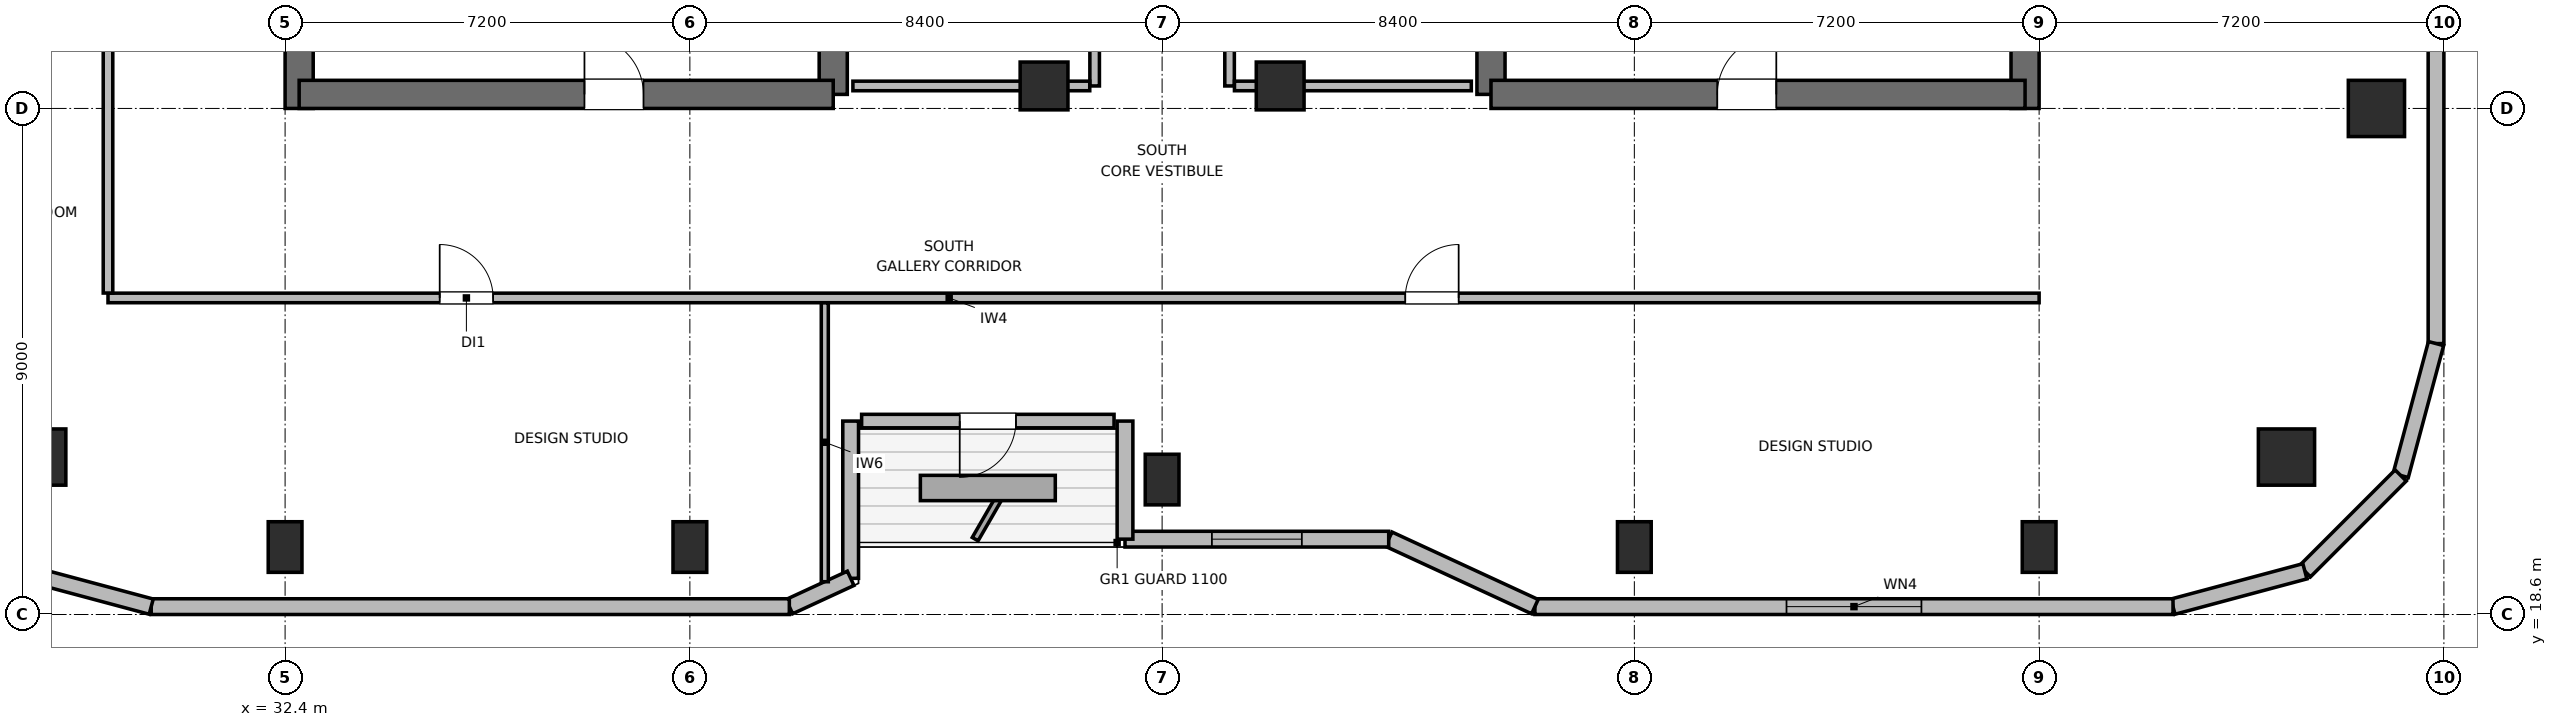
"""IFC4 building model, lengths in metres.
Left out: names, types, materials, properties, quantities, classifications, styles, units other than length and angle.
Written with IfcOpenShell. Run it as: python <this file> out.ifc"""

import sys

from ifc_helpers import new_model, si_unit, direction, frame, frame_2d, origin, origin_2d, place, context, subcontext, project, spatial, rectangle, circle, extrude, element, fill, save


model = new_model("IFC4")
c1 = context("Model", 3, precision=1e-05, world=origin(), true_north=direction((0.0, 1.0)))
c2 = subcontext(c1, "Body", "Model", "MODEL_VIEW")
j1 = project(units=[si_unit("LENGTHUNIT", "METRE"), si_unit("PLANEANGLEUNIT", "RADIAN")], contexts=[c1])
p1 = place(None, origin())
s1 = spatial("IfcSite", under=j1, at=p1, CompositionType="ELEMENT")
p2 = place(p1, origin())
s2 = spatial("IfcBuilding", under=s1, at=p2, CompositionType="ELEMENT")
p3 = place(p2, frame((0.0, 0.0, 290.1)))
s3 = spatial("IfcBuildingStorey", under=s2, at=p3, CompositionType="ELEMENT", Elevation=290.1)
p4 = place(p3, frame((32.65, 27.6, 0.0), z_axis=(0.0, 0.0, 1.0), x_axis=(0.0, 1.0, 0.0)))
e1 = element("IfcWall", 1, at=p4, inside=s3, PredefinedType="SHEAR", context=c2, shape_type="SweptSolid", body=[
    extrude(rectangle(XDim=16.8, YDim=0.5, at=frame_2d((8.4, 0.0))), origin(), (0.0, 0.0, 1.0), 3.9),
])
p5 = place(p3, frame((42.15, 27.85, 0.0), z_axis=(0.0, 0.0, 1.0), x_axis=(0.0, 1.0, 0.0)))
e2 = element("IfcWall", 2, at=p5, inside=s3, PredefinedType="SHEAR", context=c2, shape_type="SweptSolid", body=[
    extrude(rectangle(XDim=6.55, YDim=0.5, at=frame_2d((3.275, 0.0))), origin(), (0.0, 0.0, 1.0), 3.9),
])
p6 = place(p3, frame((32.65, 27.85, 0.0), z_axis=(0.0, 0.0, 1.0), x_axis=(1.0, 0.0, 0.0)))
e3 = element("IfcWall", 3, at=p6, inside=s3, PredefinedType="SHEAR", context=c2, shape_type="SweptSolid", body=[
    extrude(rectangle(XDim=9.5, YDim=0.5, at=frame_2d((4.75, 0.0))), origin(), (0.0, 0.0, 1.0), 3.9),
])
p7 = place(p6, frame((5.075, 0.0, 0.0)))
e4 = element("IfcOpeningElement", 4, at=p7, cuts=e3, PredefinedType="OPENING", context=c2, shape_type="SweptSolid", body=[
    extrude(rectangle(XDim=1.05, YDim=2.04, at=frame_2d((0.525, 1.02))), frame((0.0, 0.26, 0.0), z_axis=(0.0, -1.0, 0.0), x_axis=(1.0, 0.0, 0.0)), (0.0, 0.0, 1.0), 0.52),
])
p8 = place(p3, frame((53.85, 27.85, 0.0), z_axis=(0.0, 0.0, 1.0), x_axis=(0.0, 1.0, 0.0)))
e5 = element("IfcWall", 5, at=p8, inside=s3, PredefinedType="SHEAR", context=c2, shape_type="SweptSolid", body=[
    extrude(rectangle(XDim=7.95, YDim=0.5, at=frame_2d((3.975, 0.0))), origin(), (0.0, 0.0, 1.0), 3.9),
])
p9 = place(p3, frame((63.35, 27.6, 0.0), z_axis=(0.0, 0.0, 1.0), x_axis=(0.0, 1.0, 0.0)))
e6 = element("IfcWall", 6, at=p9, inside=s3, PredefinedType="SHEAR", context=c2, shape_type="SweptSolid", body=[
    extrude(rectangle(XDim=16.8, YDim=0.5, at=frame_2d((8.4, 0.0))), origin(), (0.0, 0.0, 1.0), 3.9),
])
p10 = place(p3, frame((53.85, 27.85, 0.0), z_axis=(0.0, 0.0, 1.0), x_axis=(1.0, 0.0, 0.0)))
e7 = element("IfcWall", 7, at=p10, inside=s3, PredefinedType="SHEAR", context=c2, shape_type="SweptSolid", body=[
    extrude(rectangle(XDim=9.5, YDim=0.5, at=frame_2d((4.75, 0.0))), origin(), (0.0, 0.0, 1.0), 3.9),
])
p11 = place(p10, frame((4.025, 0.0, 0.0)))
e8 = element("IfcOpeningElement", 8, at=p11, cuts=e7, PredefinedType="OPENING", context=c2, shape_type="SweptSolid", body=[
    extrude(rectangle(XDim=1.05, YDim=2.04, at=frame_2d((0.525, 1.02))), frame((0.0, 0.26, 0.0), z_axis=(0.0, -1.0, 0.0), x_axis=(1.0, 0.0, 0.0)), (0.0, 0.0, 1.0), 0.52),
])
for number, where, z_axis, x_axis in (
    (9, (28.0, 21.4, 0.0), (0.0, 0.0, 1.0), (1.0, 0.0, 0.0)),
    (10, (68.0, 21.4, 0.0), (0.0, 0.0, 1.0), (1.0, 0.0, 0.0)),
):
    element("IfcColumn", number, at=place(p3, frame(where, z_axis=z_axis, x_axis=x_axis)), inside=s3, PredefinedType="COLUMN", context=c2, shape_type="SweptSolid", body=[
        extrude(circle(Radius=0.5, at=origin_2d()), origin(), (0.0, 0.0, 1.0), 3.9),
    ])
for number, where, z_axis, x_axis in (
    (11, (32.4, 19.8, 0.0), (0.0, 0.0, 1.0), (1.0, 0.0, 0.0)),
    (12, (39.6, 19.8, 0.0), (0.0, 0.0, 1.0), (1.0, 0.0, 0.0)),
    (13, (48.0, 21.0, 0.0), (0.0, 0.0, 1.0), (1.0, 0.0, 0.0)),
    (14, (56.4, 19.8, 0.0), (0.0, 0.0, 1.0), (1.0, 0.0, 0.0)),
    (15, (63.6, 19.8, 0.0), (0.0, 0.0, 1.0), (1.0, 0.0, 0.0)),
):
    element("IfcColumn", number, at=place(p3, frame(where, z_axis=z_axis, x_axis=x_axis)), inside=s3, PredefinedType="COLUMN", context=c2, shape_type="SweptSolid", body=[
        extrude(rectangle(XDim=0.6, YDim=0.9, at=origin_2d()), origin(), (0.0, 0.0, 1.0), 3.9),
    ])
p12 = place(p3, frame((69.6, 27.6, 0.0), z_axis=(0.0, 0.0, 1.0), x_axis=(1.0, 0.0, 0.0)))
e16 = element("IfcColumn", 16, at=p12, inside=s3, PredefinedType="COLUMN", context=c2, shape_type="SweptSolid", body=[
    extrude(rectangle(XDim=1.0, YDim=1.0, at=origin_2d()), origin(), (0.0, 0.0, 1.0), 3.9),
])
for number, where, z_axis, x_axis in (
    (17, (45.9, 28.0, 0.0), (0.0, 0.0, 1.0), (1.0, 0.0, 0.0)),
    (18, (50.1, 28.0, 0.0), (0.0, 0.0, 1.0), (1.0, 0.0, 0.0)),
):
    element("IfcColumn", number, at=place(p3, frame(where, z_axis=z_axis, x_axis=x_axis)), inside=s3, PredefinedType="COLUMN", context=c2, shape_type="SweptSolid", body=[
        extrude(rectangle(XDim=0.85, YDim=0.85, at=origin_2d()), origin(), (0.0, 0.0, 1.0), 3.9),
    ])
p13 = place(p3, frame((70.66, 37.66, 0.0), z_axis=(0.0, 0.0, 1.0), x_axis=(0.0, -1.0, 0.0)))
e19 = element("IfcWall", 19, at=p13, inside=s3, PredefinedType="SOLIDWALL", context=c2, shape_type="SweptSolid", body=[
    extrude(rectangle(XDim=14.241, YDim=0.28, at=frame_2d((7.121, 0.0))), origin(), (0.0, 0.0, 1.0), 3.68),
])
p14 = place(p13, frame((6.321, 0.0, 0.85)))
e20 = element("IfcOpeningElement", 20, at=p14, cuts=e19, PredefinedType="OPENING", context=c2, shape_type="SweptSolid", body=[
    extrude(rectangle(XDim=1.6, YDim=1.0, at=frame_2d((0.8, 0.5))), frame((0.0, 0.15, 0.0), z_axis=(0.0, -1.0, 0.0), x_axis=(1.0, 0.0, 0.0)), (0.0, 0.0, 1.0), 0.3),
])
p15 = place(p3, frame((70.66, 23.418, 0.0), z_axis=(0.0, 0.0, 1.0), x_axis=(-0.258751159445, -0.965944013639, 0.0)))
e21 = element("IfcWall", 21, at=p15, inside=s3, PredefinedType="SOLIDWALL", context=c2, shape_type="SweptSolid", body=[
    extrude(rectangle(XDim=2.429, YDim=0.28, at=frame_2d((1.214, 0.0))), origin(), (0.0, 0.0, 1.0), 3.68),
])
p16 = place(p3, frame((70.031, 21.073, 0.0), z_axis=(0.0, 0.0, 1.0), x_axis=(-0.707106781187, -0.707106781187, 0.0)))
e22 = element("IfcWall", 22, at=p16, inside=s3, PredefinedType="SOLIDWALL", context=c2, shape_type="SweptSolid", body=[
    extrude(rectangle(XDim=2.41, YDim=0.28, at=frame_2d((1.205, 0.0))), origin(), (0.0, 0.0, 1.0), 3.68),
])
p17 = place(p3, frame((68.327, 19.368, 0.0), z_axis=(0.0, 0.0, 1.0), x_axis=(-0.965937282298, -0.25877628691, 0.0)))
e23 = element("IfcWall", 23, at=p17, inside=s3, PredefinedType="SOLIDWALL", context=c2, shape_type="SweptSolid", body=[
    extrude(rectangle(XDim=2.428, YDim=0.28, at=frame_2d((1.214, 0.0))), origin(), (0.0, 0.0, 1.0), 3.68),
])
p18 = place(p3, frame((65.982, 18.74, 0.0), z_axis=(0.0, 0.0, 1.0), x_axis=(-1.0, 0.0, 0.0)))
e24 = element("IfcWall", 24, at=p18, inside=s3, PredefinedType="SOLIDWALL", context=c2, shape_type="SweptSolid", body=[
    extrude(rectangle(XDim=11.351, YDim=0.28, at=frame_2d((5.676, 0.0))), origin(), (0.0, 0.0, 1.0), 3.68),
])
p19 = place(p18, frame((4.475, 0.0, 0.85)))
e25 = element("IfcOpeningElement", 25, at=p19, cuts=e24, PredefinedType="OPENING", context=c2, shape_type="SweptSolid", body=[
    extrude(rectangle(XDim=2.4, YDim=1.15, at=frame_2d((1.2, 0.575))), frame((0.0, 0.15, 0.0), z_axis=(0.0, -1.0, 0.0), x_axis=(1.0, 0.0, 0.0)), (0.0, 0.0, 1.0), 0.3),
])
p20 = place(p3, frame((54.631, 18.74, 0.0), z_axis=(0.0, 0.0, 1.0), x_axis=(-0.907956889006, 0.419063584324, 0.0)))
e26 = element("IfcWall", 26, at=p20, inside=s3, PredefinedType="SOLIDWALL", context=c2, shape_type="SweptSolid", body=[
    extrude(rectangle(XDim=2.864, YDim=0.28, at=frame_2d((1.432, 0.0))), origin(), (0.0, 0.0, 1.0), 2.265),
])
p21 = place(p3, frame((52.031, 19.94, 0.0), z_axis=(0.0, 0.0, 1.0), x_axis=(-1.0, 0.0, 0.0)))
e27 = element("IfcWall", 27, at=p21, inside=s3, PredefinedType="SOLIDWALL", context=c2, shape_type="SweptSolid", body=[
    extrude(rectangle(XDim=4.691, YDim=0.28, at=frame_2d((2.345, 0.0))), origin(), (0.0, 0.0, 1.0), 2.265),
])
p22 = place(p21, frame((1.545, 0.0, 0.85)))
e28 = element("IfcOpeningElement", 28, at=p22, cuts=e27, PredefinedType="OPENING", context=c2, shape_type="SweptSolid", body=[
    extrude(rectangle(XDim=1.6, YDim=1.0, at=frame_2d((0.8, 0.5))), frame((0.0, 0.15, 0.0), z_axis=(0.0, -1.0, 0.0), x_axis=(1.0, 0.0, 0.0)), (0.0, 0.0, 1.0), 0.3),
])
p23 = place(p3, frame((47.34, 19.94, 0.0), z_axis=(0.0, 0.0, 1.0), x_axis=(0.0, 1.0, 0.0)))
e29 = element("IfcWall", 29, at=p23, inside=s3, PredefinedType="SOLIDWALL", context=c2, shape_type="SweptSolid", body=[
    extrude(rectangle(XDim=2.1, YDim=0.28, at=frame_2d((1.05, 0.0))), origin(), (0.0, 0.0, 1.0), 2.265),
])
p24 = place(p3, frame((47.145, 22.04, 0.0), z_axis=(0.0, 0.0, 1.0), x_axis=(-1.0, 0.0, 0.0)))
e30 = element("IfcWall", 30, at=p24, inside=s3, PredefinedType="SOLIDWALL", context=c2, shape_type="SweptSolid", body=[
    extrude(rectangle(XDim=4.49, YDim=0.24, at=frame_2d((2.245, 0.0))), origin(), (0.0, 0.0, 1.0), 3.68),
])
p25 = place(p24, frame((1.745, 0.0, 0.0)))
e31 = element("IfcOpeningElement", 31, at=p25, cuts=e30, PredefinedType="OPENING", context=c2, shape_type="SweptSolid", body=[
    extrude(rectangle(XDim=1.0, YDim=2.02, at=frame_2d((0.5, 1.01))), frame((0.0, 0.13, 0.0), z_axis=(0.0, -1.0, 0.0), x_axis=(1.0, 0.0, 0.0)), (0.0, 0.0, 1.0), 0.26),
])
p26 = place(p3, frame((42.46, 22.04, 0.0), z_axis=(0.0, 0.0, 1.0), x_axis=(0.0, -1.0, 0.0)))
e32 = element("IfcWall", 32, at=p26, inside=s3, PredefinedType="SOLIDWALL", context=c2, shape_type="SweptSolid", body=[
    extrude(rectangle(XDim=2.796, YDim=0.28, at=frame_2d((1.398, 0.0))), origin(), (0.0, 0.0, 1.0), 2.265),
])
p27 = place(p3, frame((42.46, 19.244, 0.0), z_axis=(0.0, 0.0, 1.0), x_axis=(-0.907893953211, -0.419199916176, 0.0)))
e33 = element("IfcWall", 33, at=p27, inside=s3, PredefinedType="SOLIDWALL", context=c2, shape_type="SweptSolid", body=[
    extrude(rectangle(XDim=1.201, YDim=0.28, at=frame_2d((0.601, 0.0))), origin(), (0.0, 0.0, 1.0), 3.68),
])
p28 = place(p3, frame((41.369, 18.74, 0.0), z_axis=(0.0, 0.0, 1.0), x_axis=(-1.0, 0.0, 0.0)))
e34 = element("IfcWall", 34, at=p28, inside=s3, PredefinedType="SOLIDWALL", context=c2, shape_type="SweptSolid", body=[
    extrude(rectangle(XDim=11.351, YDim=0.28, at=frame_2d((5.675, 0.0))), origin(), (0.0, 0.0, 1.0), 3.68),
])
p29 = place(p3, frame((30.018, 18.74, 0.0), z_axis=(0.0, 0.0, 1.0), x_axis=(-0.965937282298, 0.25877628691, 0.0)))
e35 = element("IfcWall", 35, at=p29, inside=s3, PredefinedType="SOLIDWALL", context=c2, shape_type="SweptSolid", body=[
    extrude(rectangle(XDim=2.428, YDim=0.28, at=frame_2d((1.214, 0.0))), origin(), (0.0, 0.0, 1.0), 3.68),
])
p30 = place(p3, frame((46.8, 28.0, 0.0), z_axis=(0.0, 0.0, 1.0), x_axis=(0.0, 1.0, 0.0)))
e36 = element("IfcWall", 36, at=p30, inside=s3, PredefinedType="PARTITIONING", context=c2, shape_type="SweptSolid", body=[
    extrude(rectangle(XDim=4.5, YDim=0.17, at=frame_2d((2.25, 0.0))), origin(), (0.0, 0.0, 1.0), 3.68),
])
p31 = place(p30, frame((0.99, 0.0, 0.0)))
e37 = element("IfcOpeningElement", 37, at=p31, cuts=e36, PredefinedType="OPENING", context=c2, shape_type="SweptSolid", body=[
    extrude(rectangle(XDim=0.9, YDim=2.02, at=frame_2d((0.45, 1.01))), frame((0.0, 0.095, 0.0), z_axis=(0.0, -1.0, 0.0), x_axis=(1.0, 0.0, 0.0)), (0.0, 0.0, 1.0), 0.19),
])
p32 = place(p30, frame((3.24, 0.0, 0.0)))
e38 = element("IfcOpeningElement", 38, at=p32, cuts=e36, PredefinedType="OPENING", context=c2, shape_type="SweptSolid", body=[
    extrude(rectangle(XDim=0.9, YDim=2.02, at=frame_2d((0.45, 1.01))), frame((0.0, 0.095, 0.0), z_axis=(0.0, -1.0, 0.0), x_axis=(1.0, 0.0, 0.0)), (0.0, 0.0, 1.0), 0.19),
])
p33 = place(p3, frame((42.5, 28.0, 0.0), z_axis=(0.0, 0.0, 1.0), x_axis=(1.0, 0.0, 0.0)))
e39 = element("IfcWall", 39, at=p33, inside=s3, PredefinedType="PARTITIONING", context=c2, shape_type="SweptSolid", body=[
    extrude(rectangle(XDim=4.213, YDim=0.17, at=frame_2d((2.106, 0.0))), origin(), (0.0, 0.0, 1.0), 2.765),
])
p34 = place(p3, frame((49.2, 28.0, 0.0), z_axis=(0.0, 0.0, 1.0), x_axis=(0.0, 1.0, 0.0)))
e40 = element("IfcWall", 40, at=p34, inside=s3, PredefinedType="PARTITIONING", context=c2, shape_type="SweptSolid", body=[
    extrude(rectangle(XDim=4.5, YDim=0.17, at=frame_2d((2.25, 0.0))), origin(), (0.0, 0.0, 1.0), 3.68),
])
p35 = place(p34, frame((0.675, 0.0, 0.0)))
e41 = element("IfcOpeningElement", 41, at=p35, cuts=e40, PredefinedType="OPENING", context=c2, shape_type="SweptSolid", body=[
    extrude(rectangle(XDim=0.9, YDim=2.02, at=frame_2d((0.45, 1.01))), frame((0.0, 0.095, 0.0), z_axis=(0.0, -1.0, 0.0), x_axis=(1.0, 0.0, 0.0)), (0.0, 0.0, 1.0), 0.19),
])
p36 = place(p34, frame((2.925, 0.0, 0.0)))
e42 = element("IfcOpeningElement", 42, at=p36, cuts=e40, PredefinedType="OPENING", context=c2, shape_type="SweptSolid", body=[
    extrude(rectangle(XDim=0.9, YDim=2.02, at=frame_2d((0.45, 1.01))), frame((0.0, 0.095, 0.0), z_axis=(0.0, -1.0, 0.0), x_axis=(1.0, 0.0, 0.0)), (0.0, 0.0, 1.0), 0.19),
])
p37 = place(p3, frame((49.287, 28.0, 0.0), z_axis=(0.0, 0.0, 1.0), x_axis=(1.0, 0.0, 0.0)))
e43 = element("IfcWall", 43, at=p37, inside=s3, PredefinedType="PARTITIONING", context=c2, shape_type="SweptSolid", body=[
    extrude(rectangle(XDim=4.213, YDim=0.17, at=frame_2d((2.106, 0.0))), origin(), (0.0, 0.0, 1.0), 2.765),
])
p38 = place(p3, frame((29.25, 24.23, 0.0), z_axis=(0.0, 0.0, 1.0), x_axis=(1.0, 0.0, 0.0)))
e44 = element("IfcWall", 44, at=p38, inside=s3, PredefinedType="PARTITIONING", context=c2, shape_type="SweptSolid", body=[
    extrude(rectangle(XDim=34.35, YDim=0.17, at=frame_2d((17.175, 0.0))), origin(), (0.0, 0.0, 1.0), 3.68),
])
p39 = place(p38, frame((5.9, 0.0, 0.0)))
e45 = element("IfcOpeningElement", 45, at=p39, cuts=e44, PredefinedType="OPENING", context=c2, shape_type="SweptSolid", body=[
    extrude(rectangle(XDim=0.95, YDim=2.04, at=frame_2d((0.475, 1.02))), frame((0.0, 0.095, 0.0), z_axis=(0.0, -1.0, 0.0), x_axis=(1.0, 0.0, 0.0)), (0.0, 0.0, 1.0), 0.19),
])
p40 = place(p38, frame((23.075, 0.0, 0.0)))
e46 = element("IfcOpeningElement", 46, at=p40, cuts=e44, PredefinedType="OPENING", context=c2, shape_type="SweptSolid", body=[
    extrude(rectangle(XDim=0.95, YDim=2.04, at=frame_2d((0.475, 1.02))), frame((0.0, 0.095, 0.0), z_axis=(0.0, -1.0, 0.0), x_axis=(1.0, 0.0, 0.0)), (0.0, 0.0, 1.0), 0.19),
])
p41 = place(p3, frame((29.25, 24.317, 0.0), z_axis=(0.0, 0.0, 1.0), x_axis=(0.0, 1.0, 0.0)))
e47 = element("IfcWall", 47, at=p41, inside=s3, PredefinedType="PARTITIONING", context=c2, shape_type="SweptSolid", body=[
    extrude(rectangle(XDim=23.366, YDim=0.17, at=frame_2d((11.683, 0.0))), origin(), (0.0, 0.0, 1.0), 3.68),
])
p42 = place(p41, frame((4.923, 0.0, 0.0)))
e48 = element("IfcOpeningElement", 48, at=p42, cuts=e47, PredefinedType="OPENING", context=c2, shape_type="SweptSolid", body=[
    extrude(rectangle(XDim=0.95, YDim=2.04, at=frame_2d((0.475, 1.02))), frame((0.0, 0.095, 0.0), z_axis=(0.0, -1.0, 0.0), x_axis=(1.0, 0.0, 0.0)), (0.0, 0.0, 1.0), 0.19),
])
p43 = place(p41, frame((16.693, 0.0, 0.0)))
e49 = element("IfcOpeningElement", 49, at=p43, cuts=e47, PredefinedType="OPENING", context=c2, shape_type="SweptSolid", body=[
    extrude(rectangle(XDim=0.95, YDim=2.04, at=frame_2d((0.475, 1.02))), frame((0.0, 0.095, 0.0), z_axis=(0.0, -1.0, 0.0), x_axis=(1.0, 0.0, 0.0)), (0.0, 0.0, 1.0), 0.19),
])
p44 = place(p3, frame((42.0, 19.183, 0.0), z_axis=(0.0, 0.0, 1.0), x_axis=(0.0, 1.0, 0.0)))
e50 = element("IfcWall", 50, at=p44, inside=s3, PredefinedType="PARTITIONING", context=c2, shape_type="SweptSolid", body=[
    extrude(rectangle(XDim=4.96, YDim=0.125, at=frame_2d((2.48, 0.0))), origin(), (0.0, 0.0, 1.0), 3.043),
])
p45 = place(p19, origin())
e51 = element("IfcWindow", 51, at=p45, inside=s3, PartitioningType="SINGLE_PANEL", PredefinedType="WINDOW", context=c2, shape_type="SweptSolid", body=[
    extrude(rectangle(XDim=2.4, YDim=1.15, at=frame_2d((1.2, 0.575))), frame((0.0, 0.03, 0.0), z_axis=(0.0, -1.0, 0.0), x_axis=(1.0, 0.0, 0.0)), (0.0, 0.0, 1.0), 0.06),
])
fill(e25, e51)
p46 = place(p22, origin())
e52 = element("IfcWindow", 52, at=p46, inside=s3, PartitioningType="SINGLE_PANEL", PredefinedType="WINDOW", context=c2, shape_type="SweptSolid", body=[
    extrude(rectangle(XDim=1.6, YDim=1.0, at=frame_2d((0.8, 0.5))), frame((0.0, 0.03, 0.0), z_axis=(0.0, -1.0, 0.0), x_axis=(1.0, 0.0, 0.0)), (0.0, 0.0, 1.0), 0.06),
])
fill(e28, e52)
p47 = place(p25, origin())
e53 = element("IfcDoor", 53, at=p47, inside=s3, OperationType="SINGLE_SWING_RIGHT", PredefinedType="DOOR", context=c2, shape_type="SweptSolid", body=[
    extrude(rectangle(XDim=1.0, YDim=2.02, at=frame_2d((0.5, 1.01))), frame((0.0, 0.025, 0.0), z_axis=(0.0, -1.0, 0.0), x_axis=(1.0, 0.0, 0.0)), (0.0, 0.0, 1.0), 0.05),
])
fill(e31, e53)
p48 = place(p7, origin())
e54 = element("IfcDoor", 54, at=p48, inside=s3, OperationType="SINGLE_SWING_LEFT", PredefinedType="DOOR", context=c2, shape_type="SweptSolid", body=[
    extrude(rectangle(XDim=1.05, YDim=2.04, at=frame_2d((0.525, 1.02))), frame((0.0, 0.025, 0.0), z_axis=(0.0, -1.0, 0.0), x_axis=(1.0, 0.0, 0.0)), (0.0, 0.0, 1.0), 0.05),
])
fill(e4, e54)
p49 = place(p11, origin())
e55 = element("IfcDoor", 55, at=p49, inside=s3, OperationType="SINGLE_SWING_RIGHT", PredefinedType="DOOR", context=c2, shape_type="SweptSolid", body=[
    extrude(rectangle(XDim=1.05, YDim=2.04, at=frame_2d((0.525, 1.02))), frame((0.0, 0.025, 0.0), z_axis=(0.0, -1.0, 0.0), x_axis=(1.0, 0.0, 0.0)), (0.0, 0.0, 1.0), 0.05),
])
fill(e8, e55)
p50 = place(p39, origin())
e56 = element("IfcDoor", 56, at=p50, inside=s3, OperationType="SINGLE_SWING_LEFT", PredefinedType="DOOR", context=c2, shape_type="SweptSolid", body=[
    extrude(rectangle(XDim=0.95, YDim=2.04, at=frame_2d((0.475, 1.02))), frame((0.0, 0.025, 0.0), z_axis=(0.0, -1.0, 0.0), x_axis=(1.0, 0.0, 0.0)), (0.0, 0.0, 1.0), 0.05),
])
fill(e45, e56)
p51 = place(p40, origin())
e57 = element("IfcDoor", 57, at=p51, inside=s3, OperationType="SINGLE_SWING_RIGHT", PredefinedType="DOOR", context=c2, shape_type="SweptSolid", body=[
    extrude(rectangle(XDim=0.95, YDim=2.04, at=frame_2d((0.475, 1.02))), frame((0.0, 0.025, 0.0), z_axis=(0.0, -1.0, 0.0), x_axis=(1.0, 0.0, 0.0)), (0.0, 0.0, 1.0), 0.05),
])
fill(e46, e57)
save(model, sys.argv[1])
